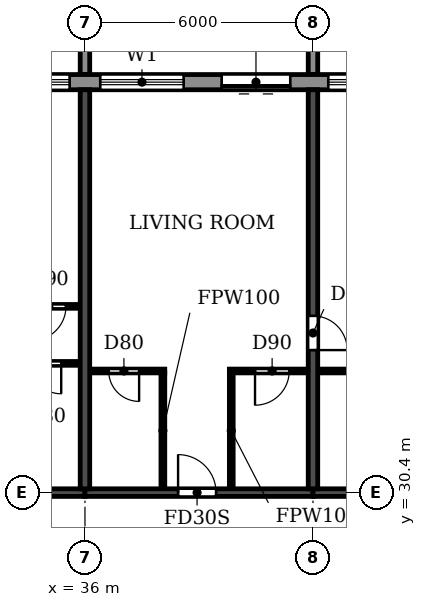
"""IFC4 building model, lengths in metres.
Left out: names, types, materials, properties, quantities, classifications, styles, units other than length and angle.
Written with IfcOpenShell. Run it as: python <this file> out.ifc"""

import sys

from ifc_helpers import new_model, si_unit, direction, frame, frame_2d, origin, place, context, subcontext, project, spatial, polyline, rectangle, outline, extrude, source, transform, mapped, element, fill, save


model = new_model("IFC4")
c1 = context("Model", 3, precision=1e-05, world=origin(), true_north=direction((0.0, 1.0)))
c2 = subcontext(c1, "Body", "Model", "MODEL_VIEW")
j1 = project(units=[si_unit("LENGTHUNIT", "METRE"), si_unit("PLANEANGLEUNIT", "RADIAN")], contexts=[c1])
p1 = place(None, origin())
s1 = spatial("IfcSite", under=j1, at=p1, CompositionType="ELEMENT")
p2 = place(p1, origin())
s2 = spatial("IfcBuilding", under=s1, at=p2, CompositionType="ELEMENT")
p3 = place(p2, frame((0.0, 0.0, 221.4)))
s3 = spatial("IfcBuildingStorey", under=s2, at=p3, CompositionType="ELEMENT", Elevation=221.4)
p4 = place(p3, frame((36.0, 30.5, 0.0), z_axis=(0.0, 0.0, 1.0), x_axis=(0.0, 1.0, 0.0)))
e1 = element("IfcWall", 1, at=p4, inside=s3, PredefinedType="SHEAR", context=c2, shape_type="SweptSolid", body=[
    extrude(rectangle(XDim=10.5, YDim=0.25, at=frame_2d((5.25, 0.0))), origin(), (0.0, 0.0, 1.0), 3.08),
])
p5 = place(p3, frame((42.0, 30.5, 0.0), z_axis=(0.0, 0.0, 1.0), x_axis=(0.0, 1.0, 0.0)))
e2 = element("IfcWall", 2, at=p5, inside=s3, PredefinedType="SHEAR", context=c2, shape_type="SweptSolid", body=[
    extrude(rectangle(XDim=10.5, YDim=0.25, at=frame_2d((5.25, 0.0))), origin(), (0.0, 0.0, 1.0), 3.08),
])
p6 = place(p5, frame((3.65, 0.0, 0.0)))
e3 = element("IfcOpeningElement", 3, at=p6, cuts=e2, PredefinedType="OPENING", context=c2, shape_type="SweptSolid", body=[
    extrude(rectangle(XDim=0.9, YDim=2.1, at=frame_2d((0.45, 1.05))), frame((0.0, 0.135, 0.0), z_axis=(0.0, -1.0, 0.0), x_axis=(1.0, 0.0, 0.0)), (0.0, 0.0, 1.0), 0.27),
])
p7 = place(p3, frame((30.0, 30.4, 0.0), z_axis=(0.0, 0.0, 1.0), x_axis=(1.0, 0.0, 0.0)))
e4 = element("IfcWall", 4, at=p7, inside=s3, PredefinedType="SHEAR", context=c2, shape_type="SweptSolid", body=[
    extrude(rectangle(XDim=6.0, YDim=0.2, at=frame_2d((3.0, 0.0))), origin(), (0.0, 0.0, 1.0), 2.48),
])
p8 = place(p7, frame((2.55, 0.0, 0.0)))
e5 = element("IfcOpeningElement", 5, at=p8, cuts=e4, PredefinedType="OPENING", context=c2, shape_type="SweptSolid", body=[
    extrude(rectangle(XDim=1.0, YDim=2.1, at=frame_2d((0.5, 1.05))), frame((0.0, 0.11, 0.0), z_axis=(0.0, -1.0, 0.0), x_axis=(1.0, 0.0, 0.0)), (0.0, 0.0, 1.0), 0.22),
])
p9 = place(p3, frame((36.0, 30.4, 0.0), z_axis=(0.0, 0.0, 1.0), x_axis=(1.0, 0.0, 0.0)))
e6 = element("IfcWall", 6, at=p9, inside=s3, PredefinedType="SHEAR", context=c2, shape_type="SweptSolid", body=[
    extrude(rectangle(XDim=6.0, YDim=0.2, at=frame_2d((3.0, 0.0))), origin(), (0.0, 0.0, 1.0), 2.48),
])
p10 = place(p9, frame((2.45, 0.0, 0.0)))
e7 = element("IfcOpeningElement", 7, at=p10, cuts=e6, PredefinedType="OPENING", context=c2, shape_type="SweptSolid", body=[
    extrude(rectangle(XDim=1.0, YDim=2.1, at=frame_2d((0.5, 1.05))), frame((0.0, 0.11, 0.0), z_axis=(0.0, -1.0, 0.0), x_axis=(1.0, 0.0, 0.0)), (0.0, 0.0, 1.0), 0.22),
])
p11 = place(p3, frame((42.0, 30.4, 0.0), z_axis=(0.0, 0.0, 1.0), x_axis=(1.0, 0.0, 0.0)))
e8 = element("IfcWall", 8, at=p11, inside=s3, PredefinedType="SHEAR", context=c2, shape_type="SweptSolid", body=[
    extrude(rectangle(XDim=6.0, YDim=0.2, at=frame_2d((3.0, 0.0))), origin(), (0.0, 0.0, 1.0), 2.48),
])
p12 = place(p3, frame((79.317, 41.2, 0.0), z_axis=(0.0, 0.0, 1.0), x_axis=(-1.0, 0.0, 0.0)))
e9 = element("IfcWall", 9, at=p12, inside=s3, PredefinedType="STANDARD", context=c2, shape_type="SweptSolid", body=[
    extrude(rectangle(XDim=56.634, YDim=0.4, at=frame_2d((28.317, 0.0))), origin(), (0.0, 0.0, 1.0), 3.08),
])
p13 = place(p12, frame((52.717, 0.0, 0.9)))
e10 = element("IfcOpeningElement", 10, at=p13, cuts=e9, PredefinedType="OPENING", context=c2, shape_type="SweptSolid", body=[
    extrude(rectangle(XDim=2.2, YDim=1.5, at=frame_2d((1.1, 0.75))), frame((0.0, 0.21, 0.0), z_axis=(0.0, -1.0, 0.0), x_axis=(1.0, 0.0, 0.0)), (0.0, 0.0, 1.0), 0.42),
])
p14 = place(p12, frame((49.717, 0.0, 0.9)))
e11 = element("IfcOpeningElement", 11, at=p14, cuts=e9, PredefinedType="OPENING", context=c2, shape_type="SweptSolid", body=[
    extrude(rectangle(XDim=2.2, YDim=1.5, at=frame_2d((1.1, 0.75))), frame((0.0, 0.21, 0.0), z_axis=(0.0, -1.0, 0.0), x_axis=(1.0, 0.0, 0.0)), (0.0, 0.0, 1.0), 0.42),
])
p15 = place(p12, frame((46.917, 0.0, 0.0)))
e12 = element("IfcOpeningElement", 12, at=p15, cuts=e9, PredefinedType="OPENING", context=c2, shape_type="SweptSolid", body=[
    extrude(rectangle(XDim=1.8, YDim=2.4, at=frame_2d((0.9, 1.2))), frame((0.0, 0.21, 0.0), z_axis=(0.0, -1.0, 0.0), x_axis=(1.0, 0.0, 0.0)), (0.0, 0.0, 1.0), 0.42),
])
p16 = place(p12, frame((43.717, 0.0, 0.9)))
e13 = element("IfcOpeningElement", 13, at=p16, cuts=e9, PredefinedType="OPENING", context=c2, shape_type="SweptSolid", body=[
    extrude(rectangle(XDim=2.2, YDim=1.5, at=frame_2d((1.1, 0.75))), frame((0.0, 0.21, 0.0), z_axis=(0.0, -1.0, 0.0), x_axis=(1.0, 0.0, 0.0)), (0.0, 0.0, 1.0), 0.42),
])
p17 = place(p12, frame((40.717, 0.0, 0.9)))
e14 = element("IfcOpeningElement", 14, at=p17, cuts=e9, PredefinedType="OPENING", context=c2, shape_type="SweptSolid", body=[
    extrude(rectangle(XDim=2.2, YDim=1.5, at=frame_2d((1.1, 0.75))), frame((0.0, 0.21, 0.0), z_axis=(0.0, -1.0, 0.0), x_axis=(1.0, 0.0, 0.0)), (0.0, 0.0, 1.0), 0.42),
])
p18 = place(p12, frame((37.917, 0.0, 0.0)))
e15 = element("IfcOpeningElement", 15, at=p18, cuts=e9, PredefinedType="OPENING", context=c2, shape_type="SweptSolid", body=[
    extrude(rectangle(XDim=1.8, YDim=2.4, at=frame_2d((0.9, 1.2))), frame((0.0, 0.21, 0.0), z_axis=(0.0, -1.0, 0.0), x_axis=(1.0, 0.0, 0.0)), (0.0, 0.0, 1.0), 0.42),
])
p19 = place(p12, frame((34.717, 0.0, 0.9)))
e16 = element("IfcOpeningElement", 16, at=p19, cuts=e9, PredefinedType="OPENING", context=c2, shape_type="SweptSolid", body=[
    extrude(rectangle(XDim=2.2, YDim=1.5, at=frame_2d((1.1, 0.75))), frame((0.0, 0.21, 0.0), z_axis=(0.0, -1.0, 0.0), x_axis=(1.0, 0.0, 0.0)), (0.0, 0.0, 1.0), 0.42),
])
p20 = place(p12, frame((31.717, 0.0, 0.9)))
e17 = element("IfcOpeningElement", 17, at=p20, cuts=e9, PredefinedType="OPENING", context=c2, shape_type="SweptSolid", body=[
    extrude(rectangle(XDim=2.2, YDim=1.5, at=frame_2d((1.1, 0.75))), frame((0.0, 0.21, 0.0), z_axis=(0.0, -1.0, 0.0), x_axis=(1.0, 0.0, 0.0)), (0.0, 0.0, 1.0), 0.42),
])
p21 = place(p12, frame((28.717, 0.0, 0.9)))
e18 = element("IfcOpeningElement", 18, at=p21, cuts=e9, PredefinedType="OPENING", context=c2, shape_type="SweptSolid", body=[
    extrude(rectangle(XDim=2.2, YDim=1.5, at=frame_2d((1.1, 0.75))), frame((0.0, 0.21, 0.0), z_axis=(0.0, -1.0, 0.0), x_axis=(1.0, 0.0, 0.0)), (0.0, 0.0, 1.0), 0.42),
])
p22 = place(p12, frame((25.917, 0.0, 0.0)))
e19 = element("IfcOpeningElement", 19, at=p22, cuts=e9, PredefinedType="OPENING", context=c2, shape_type="SweptSolid", body=[
    extrude(rectangle(XDim=1.8, YDim=2.4, at=frame_2d((0.9, 1.2))), frame((0.0, 0.21, 0.0), z_axis=(0.0, -1.0, 0.0), x_axis=(1.0, 0.0, 0.0)), (0.0, 0.0, 1.0), 0.42),
])
p23 = place(p12, frame((22.717, 0.0, 0.9)))
e20 = element("IfcOpeningElement", 20, at=p23, cuts=e9, PredefinedType="OPENING", context=c2, shape_type="SweptSolid", body=[
    extrude(rectangle(XDim=2.2, YDim=1.5, at=frame_2d((1.1, 0.75))), frame((0.0, 0.21, 0.0), z_axis=(0.0, -1.0, 0.0), x_axis=(1.0, 0.0, 0.0)), (0.0, 0.0, 1.0), 0.42),
])
p24 = place(p12, frame((19.717, 0.0, 0.9)))
e21 = element("IfcOpeningElement", 21, at=p24, cuts=e9, PredefinedType="OPENING", context=c2, shape_type="SweptSolid", body=[
    extrude(rectangle(XDim=2.2, YDim=1.5, at=frame_2d((1.1, 0.75))), frame((0.0, 0.21, 0.0), z_axis=(0.0, -1.0, 0.0), x_axis=(1.0, 0.0, 0.0)), (0.0, 0.0, 1.0), 0.42),
])
p25 = place(p12, frame((16.717, 0.0, 0.9)))
e22 = element("IfcOpeningElement", 22, at=p25, cuts=e9, PredefinedType="OPENING", context=c2, shape_type="SweptSolid", body=[
    extrude(rectangle(XDim=2.2, YDim=1.5, at=frame_2d((1.1, 0.75))), frame((0.0, 0.21, 0.0), z_axis=(0.0, -1.0, 0.0), x_axis=(1.0, 0.0, 0.0)), (0.0, 0.0, 1.0), 0.42),
])
p26 = place(p12, frame((13.917, 0.0, 0.0)))
e23 = element("IfcOpeningElement", 23, at=p26, cuts=e9, PredefinedType="OPENING", context=c2, shape_type="SweptSolid", body=[
    extrude(rectangle(XDim=1.8, YDim=2.4, at=frame_2d((0.9, 1.2))), frame((0.0, 0.21, 0.0), z_axis=(0.0, -1.0, 0.0), x_axis=(1.0, 0.0, 0.0)), (0.0, 0.0, 1.0), 0.42),
])
p27 = place(p12, frame((10.717, 0.0, 0.9)))
e24 = element("IfcOpeningElement", 24, at=p27, cuts=e9, PredefinedType="OPENING", context=c2, shape_type="SweptSolid", body=[
    extrude(rectangle(XDim=2.2, YDim=1.5, at=frame_2d((1.1, 0.75))), frame((0.0, 0.21, 0.0), z_axis=(0.0, -1.0, 0.0), x_axis=(1.0, 0.0, 0.0)), (0.0, 0.0, 1.0), 0.42),
])
p28 = place(p12, frame((7.917, 0.0, 0.0)))
e25 = element("IfcOpeningElement", 25, at=p28, cuts=e9, PredefinedType="OPENING", context=c2, shape_type="SweptSolid", body=[
    extrude(rectangle(XDim=1.8, YDim=2.4, at=frame_2d((0.9, 1.2))), frame((0.0, 0.21, 0.0), z_axis=(0.0, -1.0, 0.0), x_axis=(1.0, 0.0, 0.0)), (0.0, 0.0, 1.0), 0.42),
])
p29 = place(p12, frame((4.717, 0.0, 0.9)))
e26 = element("IfcOpeningElement", 26, at=p29, cuts=e9, PredefinedType="OPENING", context=c2, shape_type="SweptSolid", body=[
    extrude(rectangle(XDim=2.2, YDim=1.5, at=frame_2d((1.1, 0.75))), frame((0.0, 0.21, 0.0), z_axis=(0.0, -1.0, 0.0), x_axis=(1.0, 0.0, 0.0)), (0.0, 0.0, 1.0), 0.42),
])
p30 = place(p12, frame((1.917, 0.0, 0.0)))
e27 = element("IfcOpeningElement", 27, at=p30, cuts=e9, PredefinedType="OPENING", context=c2, shape_type="SweptSolid", body=[
    extrude(rectangle(XDim=1.8, YDim=2.4, at=frame_2d((0.9, 1.2))), frame((0.0, 0.21, 0.0), z_axis=(0.0, -1.0, 0.0), x_axis=(1.0, 0.0, 0.0)), (0.0, 0.0, 1.0), 0.42),
])
m1 = source(origin(), c2, "Body", "SweptSolid", [
    extrude(outline(polyline([(0.0, 0.0), (0.25, 0.0), (0.25, 3.1), (0.0, 3.1), (0.0, 0.0)])), origin(), (0.0, 0.0, 1.0), 3.1),
])
for number, where in (
    (28, (35.875, 41.4, 0.0)),
    (29, (41.875, 41.4, 0.0)),
):
    element("IfcWall", number, at=place(p3, frame(where)), inside=s3, PredefinedType="STANDARD", context=c2, shape_type="MappedRepresentation", body=[
        mapped(m1, transform((0.0, 0.0, 0.0))),
    ])
p31 = place(p3, frame((36.135, 33.6, 0.0), z_axis=(0.0, 0.0, 1.0), x_axis=(1.0, 0.0, 0.0)))
e30 = element("IfcWall", 30, at=p31, inside=s3, PredefinedType="PARTITIONING", context=c2, shape_type="SweptSolid", body=[
    extrude(rectangle(XDim=1.965, YDim=0.1, at=frame_2d((0.982, 0.0))), origin(), (0.0, 0.0, 1.0), 3.08),
])
p32 = place(p31, frame((0.49, 0.0, 0.0)))
e31 = element("IfcOpeningElement", 31, at=p32, cuts=e30, PredefinedType="OPENING", context=c2, shape_type="SweptSolid", body=[
    extrude(rectangle(XDim=0.8, YDim=2.1, at=frame_2d((0.4, 1.05))), frame((0.0, 0.06, 0.0), z_axis=(0.0, -1.0, 0.0), x_axis=(1.0, 0.0, 0.0)), (0.0, 0.0, 1.0), 0.12),
])
p33 = place(p3, frame((39.8, 33.6, 0.0), z_axis=(0.0, 0.0, 1.0), x_axis=(1.0, 0.0, 0.0)))
e32 = element("IfcWall", 32, at=p33, inside=s3, PredefinedType="PARTITIONING", context=c2, shape_type="SweptSolid", body=[
    extrude(rectangle(XDim=2.065, YDim=0.1, at=frame_2d((1.032, 0.0))), origin(), (0.0, 0.0, 1.0), 3.08),
])
p34 = place(p33, frame((0.675, 0.0, 0.0)))
e33 = element("IfcOpeningElement", 33, at=p34, cuts=e32, PredefinedType="OPENING", context=c2, shape_type="SweptSolid", body=[
    extrude(rectangle(XDim=0.9, YDim=2.1, at=frame_2d((0.45, 1.05))), frame((0.0, 0.06, 0.0), z_axis=(0.0, -1.0, 0.0), x_axis=(1.0, 0.0, 0.0)), (0.0, 0.0, 1.0), 0.12),
])
p35 = place(p3, frame((42.135, 33.6, 0.0), z_axis=(0.0, 0.0, 1.0), x_axis=(1.0, 0.0, 0.0)))
e34 = element("IfcWall", 34, at=p35, inside=s3, PredefinedType="PARTITIONING", context=c2, shape_type="SweptSolid", body=[
    extrude(rectangle(XDim=2.765, YDim=0.1, at=frame_2d((1.382, 0.0))), origin(), (0.0, 0.0, 1.0), 3.08),
])
p36 = place(p35, frame((0.965, 0.0, 0.0)))
e35 = element("IfcOpeningElement", 35, at=p36, cuts=e34, PredefinedType="OPENING", context=c2, shape_type="SweptSolid", body=[
    extrude(rectangle(XDim=0.8, YDim=2.1, at=frame_2d((0.4, 1.05))), frame((0.0, 0.06, 0.0), z_axis=(0.0, -1.0, 0.0), x_axis=(1.0, 0.0, 0.0)), (0.0, 0.0, 1.0), 0.12),
])
p37 = place(p3, frame((33.9, 33.8, 0.0), z_axis=(0.0, 0.0, 1.0), x_axis=(1.0, 0.0, 0.0)))
e36 = element("IfcWall", 36, at=p37, inside=s3, PredefinedType="PARTITIONING", context=c2, shape_type="SweptSolid", body=[
    extrude(rectangle(XDim=1.965, YDim=0.1, at=frame_2d((0.982, 0.0))), origin(), (0.0, 0.0, 1.0), 3.08),
])
p38 = place(p37, frame((0.675, 0.0, 0.0)))
e37 = element("IfcOpeningElement", 37, at=p38, cuts=e36, PredefinedType="OPENING", context=c2, shape_type="SweptSolid", body=[
    extrude(rectangle(XDim=0.8, YDim=2.1, at=frame_2d((0.4, 1.05))), frame((0.0, 0.06, 0.0), z_axis=(0.0, -1.0, 0.0), x_axis=(1.0, 0.0, 0.0)), (0.0, 0.0, 1.0), 0.12),
])
p39 = place(p3, frame((32.95, 35.3, 0.0), z_axis=(0.0, 0.0, 1.0), x_axis=(1.0, 0.0, 0.0)))
e38 = element("IfcWall", 38, at=p39, inside=s3, PredefinedType="PARTITIONING", context=c2, shape_type="SweptSolid", body=[
    extrude(rectangle(XDim=2.915, YDim=0.1, at=frame_2d((1.458, 0.0))), origin(), (0.0, 0.0, 1.0), 3.08),
])
p40 = place(p39, frame((1.65, 0.0, 0.0)))
e39 = element("IfcOpeningElement", 39, at=p40, cuts=e38, PredefinedType="OPENING", context=c2, shape_type="SweptSolid", body=[
    extrude(rectangle(XDim=0.9, YDim=2.1, at=frame_2d((0.45, 1.05))), frame((0.0, 0.06, 0.0), z_axis=(0.0, -1.0, 0.0), x_axis=(1.0, 0.0, 0.0)), (0.0, 0.0, 1.0), 0.12),
])
for number, where, z_axis, x_axis in (
    (40, (38.05, 30.51, 0.0), (0.0, 0.0, 1.0), (0.0, 1.0, 0.0)),
    (41, (39.85, 30.51, 0.0), (0.0, 0.0, 1.0), (0.0, 1.0, 0.0)),
):
    element("IfcWall", number, at=place(p3, frame(where, z_axis=z_axis, x_axis=x_axis)), inside=s3, PredefinedType="PARTITIONING", context=c2, shape_type="SweptSolid", body=[
        extrude(rectangle(XDim=3.04, YDim=0.1, at=frame_2d((1.52, 0.0))), origin(), (0.0, 0.0, 1.0), 3.08),
    ])
p41 = place(p16, origin())
e42 = element("IfcWindow", 42, at=p41, inside=s3, PartitioningType="DOUBLE_PANEL_HORIZONTAL", PredefinedType="WINDOW", context=c2, shape_type="SweptSolid", body=[
    extrude(rectangle(XDim=2.2, YDim=1.5, at=frame_2d((1.1, 0.75))), frame((0.0, 0.03, 0.0), z_axis=(0.0, -1.0, 0.0), x_axis=(1.0, 0.0, 0.0)), (0.0, 0.0, 1.0), 0.06),
])
fill(e13, e42)
p42 = place(p17, origin())
e43 = element("IfcWindow", 43, at=p42, inside=s3, PartitioningType="DOUBLE_PANEL_HORIZONTAL", PredefinedType="WINDOW", context=c2, shape_type="SweptSolid", body=[
    extrude(rectangle(XDim=2.2, YDim=1.5, at=frame_2d((1.1, 0.75))), frame((0.0, 0.03, 0.0), z_axis=(0.0, -1.0, 0.0), x_axis=(1.0, 0.0, 0.0)), (0.0, 0.0, 1.0), 0.06),
])
fill(e14, e43)
p43 = place(p18, origin())
e44 = element("IfcDoor", 44, at=p43, inside=s3, OperationType="DOUBLE_DOOR_SLIDING", PredefinedType="DOOR", context=c2, shape_type="SweptSolid", body=[
    extrude(rectangle(XDim=1.8, YDim=2.4, at=frame_2d((0.9, 1.2))), frame((0.0, 0.025, 0.0), z_axis=(0.0, -1.0, 0.0), x_axis=(1.0, 0.0, 0.0)), (0.0, 0.0, 1.0), 0.05),
])
fill(e15, e44)
p44 = place(p19, origin())
e45 = element("IfcWindow", 45, at=p44, inside=s3, PartitioningType="DOUBLE_PANEL_HORIZONTAL", PredefinedType="WINDOW", context=c2, shape_type="SweptSolid", body=[
    extrude(rectangle(XDim=2.2, YDim=1.5, at=frame_2d((1.1, 0.75))), frame((0.0, 0.03, 0.0), z_axis=(0.0, -1.0, 0.0), x_axis=(1.0, 0.0, 0.0)), (0.0, 0.0, 1.0), 0.06),
])
fill(e16, e45)
p45 = place(p38, frame((0.8, 0.0, 0.0), z_axis=(0.0, 0.0, 1.0), x_axis=(-1.0, 0.0, 0.0)))
e46 = element("IfcDoor", 46, at=p45, inside=s3, OperationType="SINGLE_SWING_LEFT", PredefinedType="DOOR", context=c2, shape_type="SweptSolid", body=[
    extrude(rectangle(XDim=0.8, YDim=2.1, at=frame_2d((0.4, 1.05))), frame((0.0, 0.025, 0.0), z_axis=(0.0, -1.0, 0.0), x_axis=(1.0, 0.0, 0.0)), (0.0, 0.0, 1.0), 0.05),
])
fill(e37, e46)
p46 = place(p40, frame((0.9, 0.0, 0.0), z_axis=(0.0, 0.0, 1.0), x_axis=(-1.0, 0.0, 0.0)))
e47 = element("IfcDoor", 47, at=p46, inside=s3, OperationType="SINGLE_SWING_RIGHT", PredefinedType="DOOR", context=c2, shape_type="SweptSolid", body=[
    extrude(rectangle(XDim=0.9, YDim=2.1, at=frame_2d((0.45, 1.05))), frame((0.0, 0.025, 0.0), z_axis=(0.0, -1.0, 0.0), x_axis=(1.0, 0.0, 0.0)), (0.0, 0.0, 1.0), 0.05),
])
fill(e39, e47)
p47 = place(p32, frame((0.8, 0.0, 0.0), z_axis=(0.0, 0.0, 1.0), x_axis=(-1.0, 0.0, 0.0)))
e48 = element("IfcDoor", 48, at=p47, inside=s3, OperationType="SINGLE_SWING_LEFT", PredefinedType="DOOR", context=c2, shape_type="SweptSolid", body=[
    extrude(rectangle(XDim=0.8, YDim=2.1, at=frame_2d((0.4, 1.05))), frame((0.0, 0.025, 0.0), z_axis=(0.0, -1.0, 0.0), x_axis=(1.0, 0.0, 0.0)), (0.0, 0.0, 1.0), 0.05),
])
fill(e31, e48)
p48 = place(p10, origin())
e49 = element("IfcDoor", 49, at=p48, inside=s3, OperationType="SINGLE_SWING_LEFT", PredefinedType="DOOR", context=c2, shape_type="SweptSolid", body=[
    extrude(rectangle(XDim=1.0, YDim=2.1, at=frame_2d((0.5, 1.05))), frame((0.0, 0.025, 0.0), z_axis=(0.0, -1.0, 0.0), x_axis=(1.0, 0.0, 0.0)), (0.0, 0.0, 1.0), 0.05),
])
fill(e7, e49)
p49 = place(p34, frame((0.9, 0.0, 0.0), z_axis=(0.0, 0.0, 1.0), x_axis=(-1.0, 0.0, 0.0)))
e50 = element("IfcDoor", 50, at=p49, inside=s3, OperationType="SINGLE_SWING_RIGHT", PredefinedType="DOOR", context=c2, shape_type="SweptSolid", body=[
    extrude(rectangle(XDim=0.9, YDim=2.1, at=frame_2d((0.45, 1.05))), frame((0.0, 0.025, 0.0), z_axis=(0.0, -1.0, 0.0), x_axis=(1.0, 0.0, 0.0)), (0.0, 0.0, 1.0), 0.05),
])
fill(e33, e50)
p50 = place(p6, frame((0.9, 0.0, 0.0), z_axis=(0.0, 0.0, 1.0), x_axis=(-1.0, 0.0, 0.0)))
e51 = element("IfcDoor", 51, at=p50, inside=s3, OperationType="SINGLE_SWING_RIGHT", PredefinedType="DOOR", context=c2, shape_type="SweptSolid", body=[
    extrude(rectangle(XDim=0.9, YDim=2.1, at=frame_2d((0.45, 1.05))), frame((0.0, 0.025, 0.0), z_axis=(0.0, -1.0, 0.0), x_axis=(1.0, 0.0, 0.0)), (0.0, 0.0, 1.0), 0.05),
])
fill(e3, e51)
save(model, sys.argv[1])
